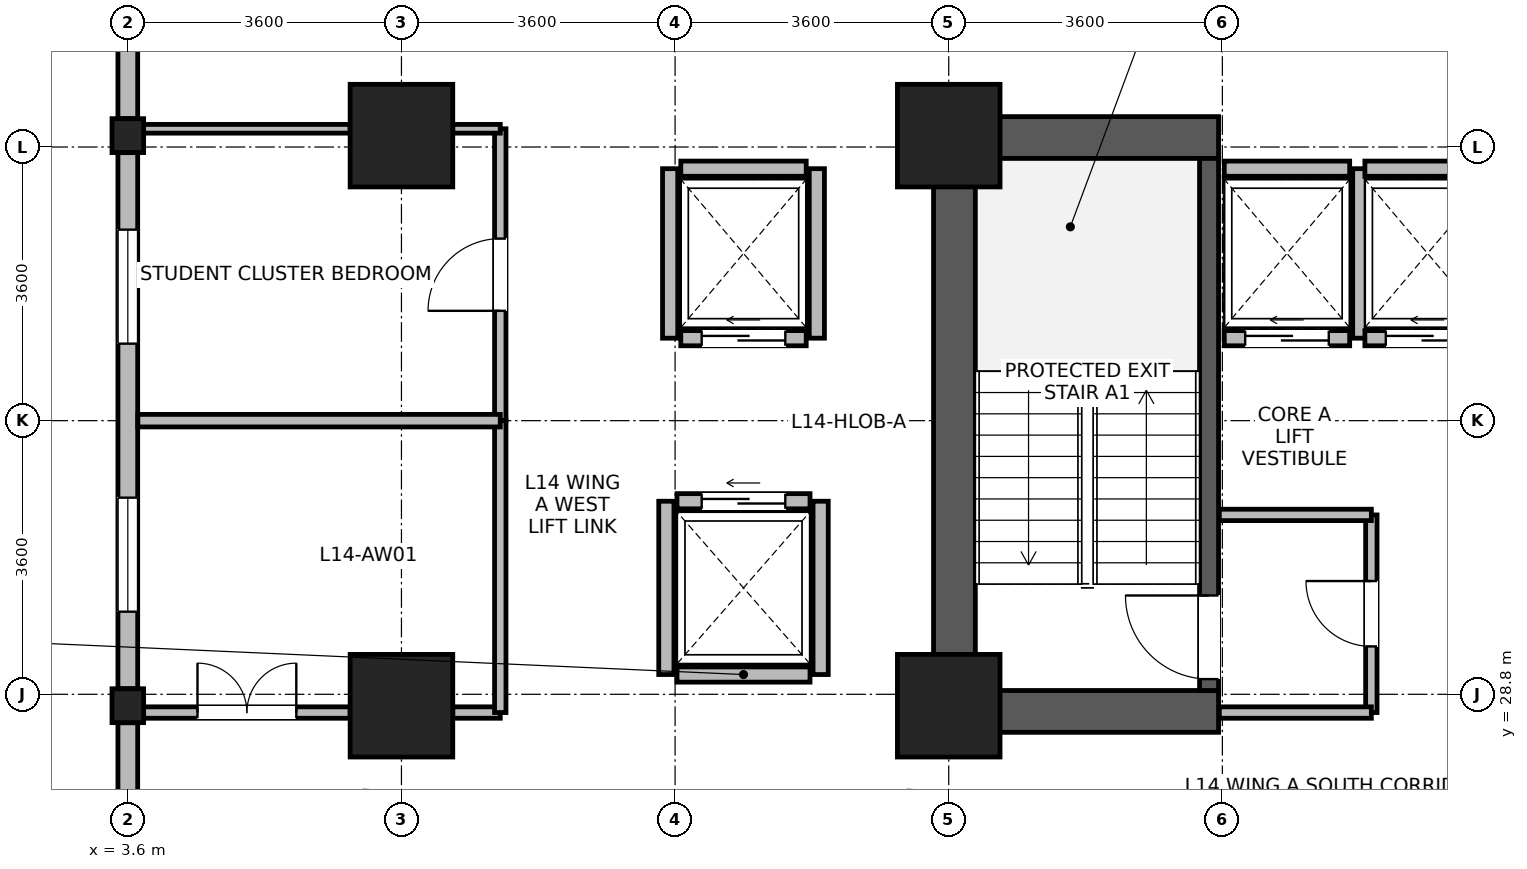
"""IFC4 building model, lengths in metres.
Left out: names, types, materials, properties, quantities, classifications, styles, units other than length and angle.
Written with IfcOpenShell. Run it as: python <this file> out.ifc"""

import sys

from ifc_helpers import new_model, si_unit, direction, frame, frame_2d, origin, origin_2d, place, context, subcontext, project, spatial, rectangle, i_section, extrude, source, transform, mapped, element, fill, save


model = new_model("IFC4")
c1 = context("Model", 3, precision=1e-05, world=origin(), true_north=direction((0.0, 1.0)))
c2 = subcontext(c1, "Body", "Model", "MODEL_VIEW")
j1 = project(units=[si_unit("LENGTHUNIT", "METRE"), si_unit("PLANEANGLEUNIT", "RADIAN")], contexts=[c1])
p1 = place(None, origin())
s1 = spatial("IfcSite", under=j1, at=p1, CompositionType="ELEMENT")
p2 = place(p1, origin())
s2 = spatial("IfcBuilding", under=s1, at=p2, CompositionType="ELEMENT")
p3 = place(p2, frame((0.0, 0.0, 58.6)))
s3 = spatial("IfcBuildingStorey", under=s2, at=p3, CompositionType="ELEMENT", Elevation=58.6)
p4 = place(p3, frame((14.475, 28.3, 0.0), z_axis=(0.0, 0.0, 1.0), x_axis=(0.0, 1.0, 0.0)))
e1 = element("IfcWall", 1, at=p4, inside=s3, PredefinedType="SHEAR", context=c2, shape_type="SweptSolid", body=[
    extrude(rectangle(XDim=8.1, YDim=0.55, at=frame_2d((4.05, 0.0))), origin(), (0.0, 0.0, 1.0), 3.45),
])
for number, where, z_axis, x_axis in (
    (2, (14.75, 28.575, 0.0), (0.0, 0.0, 1.0), (1.0, 0.0, 0.0)),
    (3, (14.75, 36.125, 0.0), (0.0, 0.0, 1.0), (1.0, 0.0, 0.0)),
):
    element("IfcWall", number, at=place(p3, frame(where, z_axis=z_axis, x_axis=x_axis)), inside=s3, PredefinedType="SHEAR", context=c2, shape_type="SweptSolid", body=[
        extrude(rectangle(XDim=3.2, YDim=0.55, at=frame_2d((1.6, 0.0))), origin(), (0.0, 0.0, 1.0), 3.45),
    ])
p5 = place(p3, frame((17.825, 28.85, 0.0), z_axis=(0.0, 0.0, 1.0), x_axis=(0.0, 1.0, 0.0)))
e4 = element("IfcWall", 4, at=p5, inside=s3, PredefinedType="SHEAR", context=c2, shape_type="SweptSolid", body=[
    extrude(rectangle(XDim=7.0, YDim=0.25, at=frame_2d((3.5, 0.0))), origin(), (0.0, 0.0, 1.0), 3.45),
])
p6 = place(p5, frame((0.15, 0.0, 0.0)))
e5 = element("IfcOpeningElement", 5, at=p6, cuts=e4, PredefinedType="OPENING", context=c2, shape_type="SweptSolid", body=[
    extrude(rectangle(XDim=1.1, YDim=2.08, at=frame_2d((0.55, 1.04))), frame((0.0, 0.135, 0.0), z_axis=(0.0, -1.0, 0.0), x_axis=(1.0, 0.0, 0.0)), (0.0, 0.0, 1.0), 0.27),
])
m1 = source(origin(), c2, "Body", "SweptSolid", [
    extrude(rectangle(XDim=1.35, YDim=1.35, at=origin_2d()), origin(), (0.0, 0.0, 1.0), 3.7),
])
for number, where, z_axis, x_axis in (
    (6, (7.2, 28.65, 0.0), (0.0, 0.0, 1.0), (1.0, 0.0, 0.0)),
    (7, (7.2, 36.15, 0.0), (0.0, 0.0, 1.0), (1.0, 0.0, 0.0)),
    (8, (14.4, 28.65, 0.0), (0.0, 0.0, 1.0), (1.0, 0.0, 0.0)),
    (9, (14.4, 36.15, 0.0), (0.0, 0.0, 1.0), (1.0, 0.0, 0.0)),
):
    element("IfcColumn", number, at=place(p3, frame(where, z_axis=z_axis, x_axis=x_axis)), inside=s3, PredefinedType="COLUMN", context=c2, shape_type="MappedRepresentation", body=[
        mapped(m1, transform((0.0, 0.0, 0.0), x_axis=(1.0, 0.0, 0.0), y_axis=(0.0, 1.0, 0.0), z_axis=(0.0, 0.0, 1.0), scale=1.0)),
    ])
m2 = source(origin(), c2, "Body", "SweptSolid", [
    extrude(i_section(OverallWidth=0.416, OverallDepth=0.446, WebThickness=0.029, FlangeThickness=0.04, FilletRadius=0.015, at=origin_2d()), origin(), (0.0, 0.0, 1.0), 3.7),
])
for number, where, z_axis, x_axis in (
    (10, (3.6, 28.65, 0.0), (0.0, 0.0, 1.0), (1.0, 0.0, 0.0)),
    (11, (3.6, 36.15, 0.0), (0.0, 0.0, 1.0), (1.0, 0.0, 0.0)),
):
    element("IfcColumn", number, at=place(p3, frame(where, z_axis=z_axis, x_axis=x_axis)), inside=s3, PredefinedType="COLUMN", context=c2, shape_type="MappedRepresentation", body=[
        mapped(m2, transform((0.0, 0.0, 0.0), x_axis=(1.0, 0.0, 0.0), y_axis=(0.0, 1.0, 0.0), z_axis=(0.0, 0.0, 1.0), scale=1.0)),
    ])
p7 = place(p3, frame((3.6, 36.374, 0.0), z_axis=(0.0, 0.0, 1.0), x_axis=(0.0, 1.0, 0.0)))
e12 = element("IfcWall", 12, at=p7, inside=s3, PredefinedType="STANDARD", context=c2, shape_type="SweptSolid", body=[
    extrude(rectangle(XDim=3.356, YDim=0.26, at=frame_2d((1.678, 0.0))), origin(), (0.0, 0.0, 1.0), 3.43),
])
p8 = place(p7, frame((0.928, 0.0, 0.85)))
e13 = element("IfcOpeningElement", 13, at=p8, cuts=e12, PredefinedType="OPENING", context=c2, shape_type="SweptSolid", body=[
    extrude(rectangle(XDim=1.5, YDim=1.85, at=frame_2d((0.75, 0.925))), frame((0.0, 0.14, 0.0), z_axis=(0.0, -1.0, 0.0), x_axis=(1.0, 0.0, 0.0)), (0.0, 0.0, 1.0), 0.28),
])
p9 = place(p3, frame((3.6, 28.874, 0.0), z_axis=(0.0, 0.0, 1.0), x_axis=(0.0, 1.0, 0.0)))
e14 = element("IfcWall", 14, at=p9, inside=s3, PredefinedType="STANDARD", context=c2, shape_type="SweptSolid", body=[
    extrude(rectangle(XDim=7.052, YDim=0.26, at=frame_2d((3.526, 0.0))), origin(), (0.0, 0.0, 1.0), 2.93),
])
p10 = place(p9, frame((1.013, 0.0, 0.85)))
e15 = element("IfcOpeningElement", 15, at=p10, cuts=e14, PredefinedType="OPENING", context=c2, shape_type="SweptSolid", body=[
    extrude(rectangle(XDim=1.5, YDim=1.85, at=frame_2d((0.75, 0.925))), frame((0.0, 0.14, 0.0), z_axis=(0.0, -1.0, 0.0), x_axis=(1.0, 0.0, 0.0)), (0.0, 0.0, 1.0), 0.28),
])
p11 = place(p9, frame((4.539, 0.0, 0.85)))
e16 = element("IfcOpeningElement", 16, at=p11, cuts=e14, PredefinedType="OPENING", context=c2, shape_type="SweptSolid", body=[
    extrude(rectangle(XDim=1.5, YDim=1.85, at=frame_2d((0.75, 0.925))), frame((0.0, 0.14, 0.0), z_axis=(0.0, -1.0, 0.0), x_axis=(1.0, 0.0, 0.0)), (0.0, 0.0, 1.0), 0.28),
])
p12 = place(p3, frame((3.6, 21.47, 0.0), z_axis=(0.0, 0.0, 1.0), x_axis=(0.0, 1.0, 0.0)))
e17 = element("IfcWall", 17, at=p12, inside=s3, PredefinedType="STANDARD", context=c2, shape_type="SweptSolid", body=[
    extrude(rectangle(XDim=6.956, YDim=0.26, at=frame_2d((3.478, 0.0))), origin(), (0.0, 0.0, 1.0), 3.43),
])
p13 = place(p12, frame((0.989, 0.0, 0.85)))
e18 = element("IfcOpeningElement", 18, at=p13, cuts=e17, PredefinedType="OPENING", context=c2, shape_type="SweptSolid", body=[
    extrude(rectangle(XDim=1.5, YDim=1.85, at=frame_2d((0.75, 0.925))), frame((0.0, 0.14, 0.0), z_axis=(0.0, -1.0, 0.0), x_axis=(1.0, 0.0, 0.0)), (0.0, 0.0, 1.0), 0.28),
])
p14 = place(p12, frame((3.003, 0.0, 0.85)))
e19 = element("IfcOpeningElement", 19, at=p14, cuts=e17, PredefinedType="OPENING", context=c2, shape_type="SweptSolid", body=[
    extrude(rectangle(XDim=0.95, YDim=1.75, at=frame_2d((0.475, 0.875))), frame((0.0, 0.14, 0.0), z_axis=(0.0, -1.0, 0.0), x_axis=(1.0, 0.0, 0.0)), (0.0, 0.0, 1.0), 0.28),
])
p15 = place(p3, frame((18.025, 33.485, 0.0), z_axis=(0.0, 0.0, 1.0), x_axis=(1.0, 0.0, 0.0)))
e20 = element("IfcWall", 20, at=p15, inside=s3, PredefinedType="PARTITIONING", context=c2, shape_type="SweptSolid", body=[
    extrude(rectangle(XDim=1.65, YDim=0.2, at=frame_2d((0.825, 0.0))), origin(), (0.0, 0.0, 1.0), 3.43),
])
p16 = place(p15, frame((0.275, 0.0, 0.0)))
e21 = element("IfcOpeningElement", 21, at=p16, cuts=e20, PredefinedType="OPENING", context=c2, shape_type="SweptSolid", body=[
    extrude(rectangle(XDim=1.1, YDim=2.12, at=frame_2d((0.55, 1.06))), frame((0.0, 0.11, 0.0), z_axis=(0.0, -1.0, 0.0), x_axis=(1.0, 0.0, 0.0)), (0.0, 0.0, 1.0), 0.22),
])
p17 = place(p3, frame((18.025, 35.715, 0.0), z_axis=(0.0, 0.0, 1.0), x_axis=(1.0, 0.0, 0.0)))
e22 = element("IfcWall", 22, at=p17, inside=s3, PredefinedType="PARTITIONING", context=c2, shape_type="SweptSolid", body=[
    extrude(rectangle(XDim=1.65, YDim=0.2, at=frame_2d((0.825, 0.0))), origin(), (0.0, 0.0, 1.0), 2.23),
])
p18 = place(p3, frame((19.815, 33.485, 0.0), z_axis=(0.0, 0.0, 1.0), x_axis=(0.0, 1.0, 0.0)))
e23 = element("IfcWall", 23, at=p18, inside=s3, PredefinedType="PARTITIONING", context=c2, shape_type="SweptSolid", body=[
    extrude(rectangle(XDim=2.23, YDim=0.2, at=frame_2d((1.115, 0.0))), origin(), (0.0, 0.0, 1.0), 3.43),
])
p19 = place(p3, frame((19.875, 33.485, 0.0), z_axis=(0.0, 0.0, 1.0), x_axis=(1.0, 0.0, 0.0)))
e24 = element("IfcWall", 24, at=p19, inside=s3, PredefinedType="PARTITIONING", context=c2, shape_type="SweptSolid", body=[
    extrude(rectangle(XDim=1.65, YDim=0.2, at=frame_2d((0.825, 0.0))), origin(), (0.0, 0.0, 1.0), 3.43),
])
p20 = place(p19, frame((0.275, 0.0, 0.0)))
e25 = element("IfcOpeningElement", 25, at=p20, cuts=e24, PredefinedType="OPENING", context=c2, shape_type="SweptSolid", body=[
    extrude(rectangle(XDim=1.1, YDim=2.12, at=frame_2d((0.55, 1.06))), frame((0.0, 0.11, 0.0), z_axis=(0.0, -1.0, 0.0), x_axis=(1.0, 0.0, 0.0)), (0.0, 0.0, 1.0), 0.22),
])
p21 = place(p3, frame((19.875, 35.715, 0.0), z_axis=(0.0, 0.0, 1.0), x_axis=(1.0, 0.0, 0.0)))
e26 = element("IfcWall", 26, at=p21, inside=s3, PredefinedType="PARTITIONING", context=c2, shape_type="SweptSolid", body=[
    extrude(rectangle(XDim=1.65, YDim=0.2, at=frame_2d((0.825, 0.0))), origin(), (0.0, 0.0, 1.0), 2.23),
])
p22 = place(p3, frame((10.825, 29.06, 0.0), z_axis=(0.0, 0.0, 1.0), x_axis=(1.0, 0.0, 0.0)))
e27 = element("IfcWall", 27, at=p22, inside=s3, PredefinedType="PARTITIONING", context=c2, shape_type="SweptSolid", body=[
    extrude(rectangle(XDim=1.75, YDim=0.2, at=frame_2d((0.875, 0.0))), origin(), (0.0, 0.0, 1.0), 3.43),
])
p23 = place(p3, frame((10.825, 31.34, 0.0), z_axis=(0.0, 0.0, 1.0), x_axis=(1.0, 0.0, 0.0)))
e28 = element("IfcWall", 28, at=p23, inside=s3, PredefinedType="PARTITIONING", context=c2, shape_type="SweptSolid", body=[
    extrude(rectangle(XDim=1.75, YDim=0.2, at=frame_2d((0.875, 0.0))), origin(), (0.0, 0.0, 1.0), 3.43),
])
p24 = place(p23, frame((0.325, 0.0, 0.0)))
e29 = element("IfcOpeningElement", 29, at=p24, cuts=e28, PredefinedType="OPENING", context=c2, shape_type="SweptSolid", body=[
    extrude(rectangle(XDim=1.1, YDim=2.12, at=frame_2d((0.55, 1.06))), frame((0.0, 0.11, 0.0), z_axis=(0.0, -1.0, 0.0), x_axis=(1.0, 0.0, 0.0)), (0.0, 0.0, 1.0), 0.22),
])
for number, where, z_axis, x_axis in (
    (30, (10.685, 29.06, 0.0), (0.0, 0.0, 1.0), (0.0, 1.0, 0.0)),
    (31, (12.715, 29.06, 0.0), (0.0, 0.0, 1.0), (0.0, 1.0, 0.0)),
):
    element("IfcWall", number, at=place(p3, frame(where, z_axis=z_axis, x_axis=x_axis)), inside=s3, PredefinedType="PARTITIONING", context=c2, shape_type="SweptSolid", body=[
        extrude(rectangle(XDim=2.28, YDim=0.2, at=frame_2d((1.14, 0.0))), origin(), (0.0, 0.0, 1.0), 3.43),
    ])
p25 = place(p3, frame((10.875, 33.485, 0.0), z_axis=(0.0, 0.0, 1.0), x_axis=(1.0, 0.0, 0.0)))
e32 = element("IfcWall", 32, at=p25, inside=s3, PredefinedType="PARTITIONING", context=c2, shape_type="SweptSolid", body=[
    extrude(rectangle(XDim=1.65, YDim=0.2, at=frame_2d((0.825, 0.0))), origin(), (0.0, 0.0, 1.0), 3.43),
])
p26 = place(p25, frame((0.275, 0.0, 0.0)))
e33 = element("IfcOpeningElement", 33, at=p26, cuts=e32, PredefinedType="OPENING", context=c2, shape_type="SweptSolid", body=[
    extrude(rectangle(XDim=1.1, YDim=2.12, at=frame_2d((0.55, 1.06))), frame((0.0, 0.11, 0.0), z_axis=(0.0, -1.0, 0.0), x_axis=(1.0, 0.0, 0.0)), (0.0, 0.0, 1.0), 0.22),
])
p27 = place(p3, frame((10.875, 35.715, 0.0), z_axis=(0.0, 0.0, 1.0), x_axis=(1.0, 0.0, 0.0)))
e34 = element("IfcWall", 34, at=p27, inside=s3, PredefinedType="PARTITIONING", context=c2, shape_type="SweptSolid", body=[
    extrude(rectangle(XDim=1.65, YDim=0.2, at=frame_2d((0.825, 0.0))), origin(), (0.0, 0.0, 1.0), 3.43),
])
for number, where, z_axis, x_axis in (
    (35, (10.735, 33.485, 0.0), (0.0, 0.0, 1.0), (0.0, 1.0, 0.0)),
    (36, (12.665, 33.485, 0.0), (0.0, 0.0, 1.0), (0.0, 1.0, 0.0)),
):
    element("IfcWall", number, at=place(p3, frame(where, z_axis=z_axis, x_axis=x_axis)), inside=s3, PredefinedType="PARTITIONING", context=c2, shape_type="SweptSolid", body=[
        extrude(rectangle(XDim=2.23, YDim=0.2, at=frame_2d((1.115, 0.0))), origin(), (0.0, 0.0, 1.0), 3.43),
    ])
p28 = place(p3, frame((3.808, 28.56, 0.0), z_axis=(0.0, 0.0, 1.0), x_axis=(1.0, 0.0, 0.0)))
e37 = element("IfcWall", 37, at=p28, inside=s3, PredefinedType="PARTITIONING", context=c2, shape_type="SweptSolid", body=[
    extrude(rectangle(XDim=2.717, YDim=0.15, at=frame_2d((1.358, 0.0))), origin(), (0.0, 0.0, 1.0), 2.78),
])
p29 = place(p28, frame((0.708, 0.0, 0.0)))
e38 = element("IfcOpeningElement", 38, at=p29, cuts=e37, PredefinedType="OPENING", context=c2, shape_type="SweptSolid", body=[
    extrude(rectangle(XDim=1.3, YDim=2.12, at=frame_2d((0.65, 1.06))), frame((0.0, 0.085, 0.0), z_axis=(0.0, -1.0, 0.0), x_axis=(1.0, 0.0, 0.0)), (0.0, 0.0, 1.0), 0.17),
])
p30 = place(p3, frame((7.875, 28.56, 0.0), z_axis=(0.0, 0.0, 1.0), x_axis=(1.0, 0.0, 0.0)))
e39 = element("IfcWall", 39, at=p30, inside=s3, PredefinedType="PARTITIONING", context=c2, shape_type="SweptSolid", body=[
    extrude(rectangle(XDim=0.625, YDim=0.15, at=frame_2d((0.312, 0.0))), origin(), (0.0, 0.0, 1.0), 2.78),
])
p31 = place(p3, frame((8.5, 32.4, 0.0), z_axis=(0.0, 0.0, 1.0), x_axis=(0.0, 1.0, 0.0)))
e40 = element("IfcWall", 40, at=p31, inside=s3, PredefinedType="PARTITIONING", context=c2, shape_type="SweptSolid", body=[
    extrude(rectangle(XDim=3.84, YDim=0.15, at=frame_2d((1.92, 0.0))), origin(), (0.0, 0.0, 1.0), 3.43),
])
p32 = place(p31, frame((1.445, 0.0, 0.0)))
e41 = element("IfcOpeningElement", 41, at=p32, cuts=e40, PredefinedType="OPENING", context=c2, shape_type="SweptSolid", body=[
    extrude(rectangle(XDim=0.95, YDim=2.1, at=frame_2d((0.475, 1.05))), frame((0.0, 0.085, 0.0), z_axis=(0.0, -1.0, 0.0), x_axis=(1.0, 0.0, 0.0)), (0.0, 0.0, 1.0), 0.17),
])
p33 = place(p3, frame((8.5, 28.56, 0.0), z_axis=(0.0, 0.0, 1.0), x_axis=(0.0, 1.0, 0.0)))
e42 = element("IfcWall", 42, at=p33, inside=s3, PredefinedType="PARTITIONING", context=c2, shape_type="SweptSolid", body=[
    extrude(rectangle(XDim=3.84, YDim=0.15, at=frame_2d((1.92, 0.0))), origin(), (0.0, 0.0, 1.0), 3.43),
])
p34 = place(p3, frame((19.96, 28.56, 0.0), z_axis=(0.0, 0.0, 1.0), x_axis=(0.0, 1.0, 0.0)))
e43 = element("IfcWall", 43, at=p34, inside=s3, PredefinedType="PARTITIONING", context=c2, shape_type="SweptSolid", body=[
    extrude(rectangle(XDim=2.6, YDim=0.15, at=frame_2d((1.3, 0.0))), origin(), (0.0, 0.0, 1.0), 3.43),
])
p35 = place(p34, frame((0.87, 0.0, 0.0)))
e44 = element("IfcOpeningElement", 44, at=p35, cuts=e43, PredefinedType="OPENING", context=c2, shape_type="SweptSolid", body=[
    extrude(rectangle(XDim=0.86, YDim=2.02, at=frame_2d((0.43, 1.01))), frame((0.0, 0.085, 0.0), z_axis=(0.0, -1.0, 0.0), x_axis=(1.0, 0.0, 0.0)), (0.0, 0.0, 1.0), 0.17),
])
p36 = place(p3, frame((17.96, 28.56, 0.0), z_axis=(0.0, 0.0, 1.0), x_axis=(1.0, 0.0, 0.0)))
e45 = element("IfcWall", 45, at=p36, inside=s3, PredefinedType="PARTITIONING", context=c2, shape_type="SweptSolid", body=[
    extrude(rectangle(XDim=2.0, YDim=0.15, at=frame_2d((1.0, 0.0))), origin(), (0.0, 0.0, 1.0), 2.23),
])
p37 = place(p3, frame((17.96, 31.16, 0.0), z_axis=(0.0, 0.0, 1.0), x_axis=(1.0, 0.0, 0.0)))
e46 = element("IfcWall", 46, at=p37, inside=s3, PredefinedType="PARTITIONING", context=c2, shape_type="SweptSolid", body=[
    extrude(rectangle(XDim=2.0, YDim=0.15, at=frame_2d((1.0, 0.0))), origin(), (0.0, 0.0, 1.0), 3.43),
])
p38 = place(p3, frame((3.732, 32.4, 0.0), z_axis=(0.0, 0.0, 1.0), x_axis=(1.0, 0.0, 0.0)))
e47 = element("IfcWall", 47, at=p38, inside=s3, PredefinedType="PARTITIONING", context=c2, shape_type="SweptSolid", body=[
    extrude(rectangle(XDim=4.768, YDim=0.165, at=frame_2d((2.384, 0.0))), origin(), (0.0, 0.0, 1.0), 3.43),
])
p39 = place(p3, frame((3.808, 36.24, 0.0), z_axis=(0.0, 0.0, 1.0), x_axis=(1.0, 0.0, 0.0)))
e48 = element("IfcWall", 48, at=p39, inside=s3, PredefinedType="PARTITIONING", context=c2, shape_type="SweptSolid", body=[
    extrude(rectangle(XDim=2.717, YDim=0.115, at=frame_2d((1.358, 0.0))), origin(), (0.0, 0.0, 1.0), 2.78),
])
p40 = place(p3, frame((7.875, 36.24, 0.0), z_axis=(0.0, 0.0, 1.0), x_axis=(1.0, 0.0, 0.0)))
e49 = element("IfcWall", 49, at=p40, inside=s3, PredefinedType="PARTITIONING", context=c2, shape_type="SweptSolid", body=[
    extrude(rectangle(XDim=0.625, YDim=0.115, at=frame_2d((0.312, 0.0))), origin(), (0.0, 0.0, 1.0), 2.78),
])
p41 = place(p10, origin())
e50 = element("IfcWindow", 50, at=p41, inside=s3, PartitioningType="SINGLE_PANEL", PredefinedType="WINDOW", context=c2, shape_type="SweptSolid", body=[
    extrude(rectangle(XDim=1.5, YDim=1.85, at=frame_2d((0.75, 0.925))), frame((0.0, 0.03, 0.0), z_axis=(0.0, -1.0, 0.0), x_axis=(1.0, 0.0, 0.0)), (0.0, 0.0, 1.0), 0.06),
])
fill(e15, e50)
p42 = place(p11, origin())
e51 = element("IfcWindow", 51, at=p42, inside=s3, PartitioningType="SINGLE_PANEL", PredefinedType="WINDOW", context=c2, shape_type="SweptSolid", body=[
    extrude(rectangle(XDim=1.5, YDim=1.85, at=frame_2d((0.75, 0.925))), frame((0.0, 0.03, 0.0), z_axis=(0.0, -1.0, 0.0), x_axis=(1.0, 0.0, 0.0)), (0.0, 0.0, 1.0), 0.06),
])
fill(e16, e51)
p43 = place(p6, origin())
e52 = element("IfcDoor", 52, at=p43, inside=s3, OperationType="SINGLE_SWING_RIGHT", PredefinedType="DOOR", context=c2, shape_type="SweptSolid", body=[
    extrude(rectangle(XDim=1.1, YDim=2.08, at=frame_2d((0.55, 1.04))), frame((0.0, 0.025, 0.0), z_axis=(0.0, -1.0, 0.0), x_axis=(1.0, 0.0, 0.0)), (0.0, 0.0, 1.0), 0.05),
])
fill(e5, e52)
p44 = place(p16, origin())
e53 = element("IfcDoor", 53, at=p44, inside=s3, OperationType="SLIDING_TO_LEFT", PredefinedType="DOOR", context=c2, shape_type="SweptSolid", body=[
    extrude(rectangle(XDim=1.1, YDim=2.12, at=frame_2d((0.55, 1.06))), frame((0.0, 0.025, 0.0), z_axis=(0.0, -1.0, 0.0), x_axis=(1.0, 0.0, 0.0)), (0.0, 0.0, 1.0), 0.05),
])
fill(e21, e53)
p45 = place(p20, origin())
e54 = element("IfcDoor", 54, at=p45, inside=s3, OperationType="SLIDING_TO_LEFT", PredefinedType="DOOR", context=c2, shape_type="SweptSolid", body=[
    extrude(rectangle(XDim=1.1, YDim=2.12, at=frame_2d((0.55, 1.06))), frame((0.0, 0.025, 0.0), z_axis=(0.0, -1.0, 0.0), x_axis=(1.0, 0.0, 0.0)), (0.0, 0.0, 1.0), 0.05),
])
fill(e25, e54)
p46 = place(p24, origin())
e55 = element("IfcDoor", 55, at=p46, inside=s3, OperationType="SLIDING_TO_LEFT", PredefinedType="DOOR", context=c2, shape_type="SweptSolid", body=[
    extrude(rectangle(XDim=1.1, YDim=2.12, at=frame_2d((0.55, 1.06))), frame((0.0, 0.025, 0.0), z_axis=(0.0, -1.0, 0.0), x_axis=(1.0, 0.0, 0.0)), (0.0, 0.0, 1.0), 0.05),
])
fill(e29, e55)
p47 = place(p26, origin())
e56 = element("IfcDoor", 56, at=p47, inside=s3, OperationType="SLIDING_TO_LEFT", PredefinedType="DOOR", context=c2, shape_type="SweptSolid", body=[
    extrude(rectangle(XDim=1.1, YDim=2.12, at=frame_2d((0.55, 1.06))), frame((0.0, 0.025, 0.0), z_axis=(0.0, -1.0, 0.0), x_axis=(1.0, 0.0, 0.0)), (0.0, 0.0, 1.0), 0.05),
])
fill(e33, e56)
p48 = place(p29, origin())
e57 = element("IfcDoor", 57, at=p48, inside=s3, OperationType="DOUBLE_DOOR_SINGLE_SWING", PredefinedType="DOOR", context=c2, shape_type="SweptSolid", body=[
    extrude(rectangle(XDim=1.3, YDim=2.12, at=frame_2d((0.65, 1.06))), frame((0.0, 0.025, 0.0), z_axis=(0.0, -1.0, 0.0), x_axis=(1.0, 0.0, 0.0)), (0.0, 0.0, 1.0), 0.05),
])
fill(e38, e57)
p49 = place(p32, origin())
e58 = element("IfcDoor", 58, at=p49, inside=s3, OperationType="SINGLE_SWING_LEFT", PredefinedType="DOOR", context=c2, shape_type="SweptSolid", body=[
    extrude(rectangle(XDim=0.95, YDim=2.1, at=frame_2d((0.475, 1.05))), frame((0.0, 0.025, 0.0), z_axis=(0.0, -1.0, 0.0), x_axis=(1.0, 0.0, 0.0)), (0.0, 0.0, 1.0), 0.05),
])
fill(e41, e58)
p50 = place(p35, origin())
e59 = element("IfcDoor", 59, at=p50, inside=s3, OperationType="SINGLE_SWING_RIGHT", PredefinedType="DOOR", context=c2, shape_type="SweptSolid", body=[
    extrude(rectangle(XDim=0.86, YDim=2.02, at=frame_2d((0.43, 1.01))), frame((0.0, 0.025, 0.0), z_axis=(0.0, -1.0, 0.0), x_axis=(1.0, 0.0, 0.0)), (0.0, 0.0, 1.0), 0.05),
])
fill(e44, e59)
save(model, sys.argv[1])
